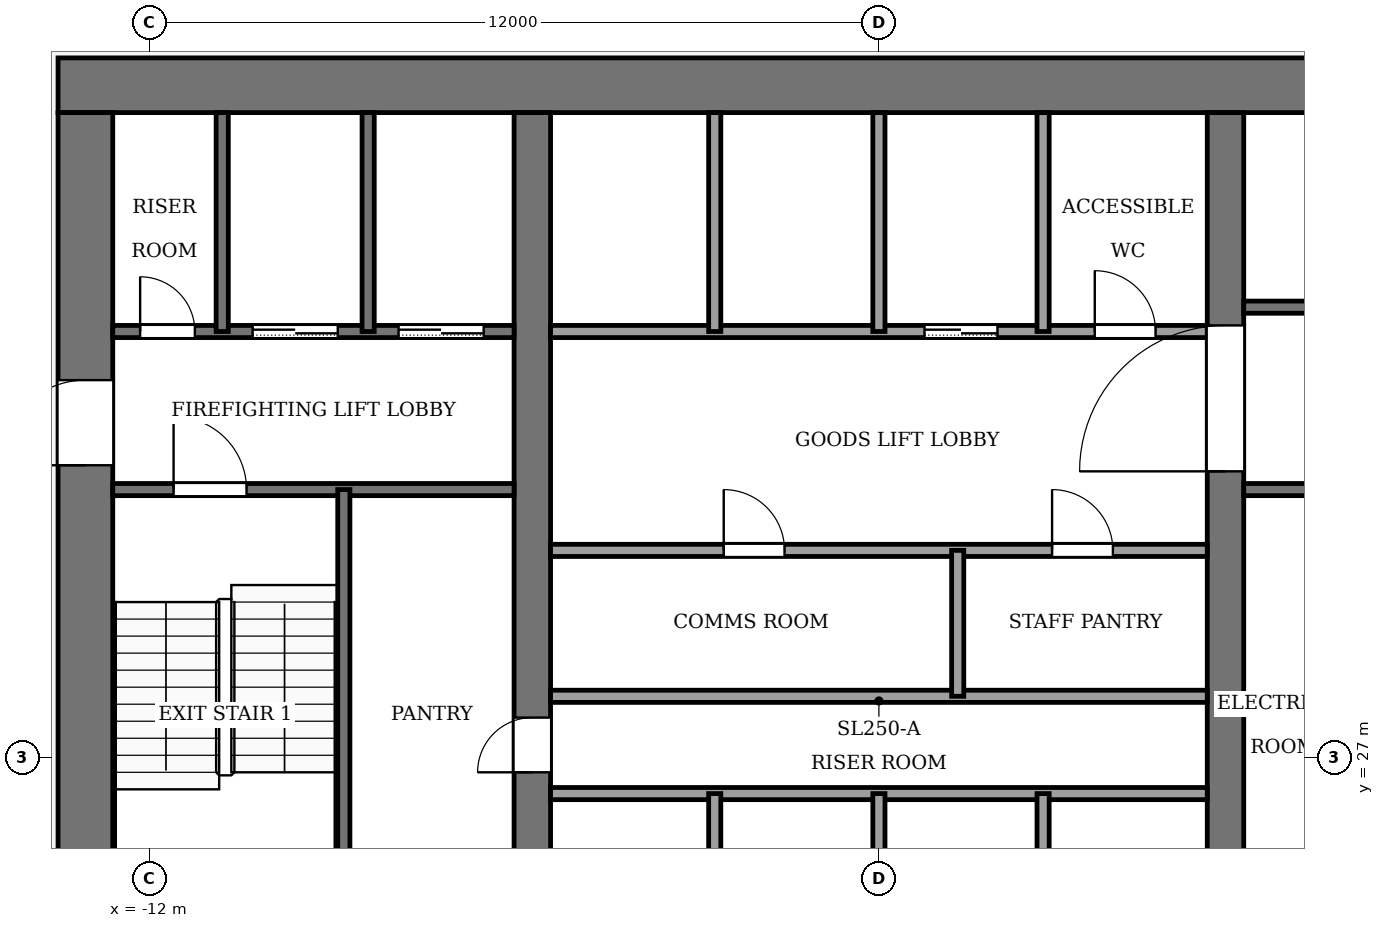
"""IFC4 building model, lengths in metres.
Left out: names, types, materials, properties, quantities, classifications, styles, units other than length and angle.
Written with IfcOpenShell. Run it as: python <this file> out.ifc"""

import sys

from ifc_helpers import new_model, si_unit, direction, frame, frame_2d, origin, place, context, subcontext, project, spatial, rectangle, extrude, element, fill, save


model = new_model("IFC4")
c1 = context("Model", 3, precision=1e-05, world=origin(), true_north=direction((0.0, 1.0)))
c2 = subcontext(c1, "Body", "Model", "MODEL_VIEW")
j1 = project(units=[si_unit("LENGTHUNIT", "METRE"), si_unit("PLANEANGLEUNIT", "RADIAN")], contexts=[c1])
p1 = place(None, origin())
s1 = spatial("IfcSite", under=j1, at=p1, CompositionType="ELEMENT")
p2 = place(p1, origin())
s2 = spatial("IfcBuilding", under=s1, at=p2, CompositionType="ELEMENT")
p3 = place(p2, frame((0.0, 0.0, 210.0)))
s3 = spatial("IfcBuildingStorey", under=s2, at=p3, CompositionType="ELEMENT", Elevation=210.0)
p4 = place(p3, frame((-13.5, 38.05, -0.13), z_axis=(0.0, 0.0, 1.0), x_axis=(1.0, 0.0, 0.0)))
e1 = element("IfcWall", 1, at=p4, inside=s3, PredefinedType="SHEAR", context=c2, shape_type="SweptSolid", body=[
    extrude(rectangle(XDim=27.0, YDim=0.9, at=frame_2d((13.5, 0.0))), origin(), (0.0, 0.0, 1.0), 4.0),
])
p5 = place(p3, frame((-13.05, 18.4, -0.13), z_axis=(0.0, 0.0, 1.0), x_axis=(0.0, 1.0, 0.0)))
e2 = element("IfcWall", 2, at=p5, inside=s3, PredefinedType="SHEAR", context=c2, shape_type="SweptSolid", body=[
    extrude(rectangle(XDim=19.2, YDim=0.9, at=frame_2d((9.6, 0.0))), origin(), (0.0, 0.0, 1.0), 4.0),
])
p6 = place(p5, frame((2.8, 0.0, 0.13)))
e3 = element("IfcOpeningElement", 3, at=p6, cuts=e2, PredefinedType="OPENING", context=c2, shape_type="SweptSolid", body=[
    extrude(rectangle(XDim=2.4, YDim=2.4, at=frame_2d((1.2, 1.2))), frame((0.0, 0.46, 0.0), z_axis=(0.0, -1.0, 0.0), x_axis=(1.0, 0.0, 0.0)), (0.0, 0.0, 1.0), 0.92),
])
p7 = place(p5, frame((13.4, 0.0, 0.13)))
e4 = element("IfcOpeningElement", 4, at=p7, cuts=e2, PredefinedType="OPENING", context=c2, shape_type="SweptSolid", body=[
    extrude(rectangle(XDim=1.4, YDim=2.2, at=frame_2d((0.7, 1.1))), frame((0.0, 0.46, 0.0), z_axis=(0.0, -1.0, 0.0), x_axis=(1.0, 0.0, 0.0)), (0.0, 0.0, 1.0), 0.92),
])
p8 = place(p3, frame((-5.7, 18.4, -0.13), z_axis=(0.0, 0.0, 1.0), x_axis=(0.0, 1.0, 0.0)))
e5 = element("IfcWall", 5, at=p8, inside=s3, PredefinedType="SHEAR", context=c2, shape_type="SweptSolid", body=[
    extrude(rectangle(XDim=19.2, YDim=0.6, at=frame_2d((9.6, 0.0))), origin(), (0.0, 0.0, 1.0), 4.0),
])
p9 = place(p8, frame((8.35, 0.0, 0.13)))
e6 = element("IfcOpeningElement", 6, at=p9, cuts=e5, PredefinedType="OPENING", context=c2, shape_type="SweptSolid", body=[
    extrude(rectangle(XDim=0.9, YDim=2.1, at=frame_2d((0.45, 1.05))), frame((0.0, 0.31, 0.0), z_axis=(0.0, -1.0, 0.0), x_axis=(1.0, 0.0, 0.0)), (0.0, 0.0, 1.0), 0.62),
])
p10 = place(p3, frame((5.7, 18.4, -0.13), z_axis=(0.0, 0.0, 1.0), x_axis=(0.0, 1.0, 0.0)))
e7 = element("IfcWall", 7, at=p10, inside=s3, PredefinedType="SHEAR", context=c2, shape_type="SweptSolid", body=[
    extrude(rectangle(XDim=19.2, YDim=0.6, at=frame_2d((9.6, 0.0))), origin(), (0.0, 0.0, 1.0), 4.0),
])
p11 = place(p10, frame((13.3, 0.0, 0.13)))
e8 = element("IfcOpeningElement", 8, at=p11, cuts=e7, PredefinedType="OPENING", context=c2, shape_type="SweptSolid", body=[
    extrude(rectangle(XDim=2.4, YDim=2.4, at=frame_2d((1.2, 1.2))), frame((0.0, 0.31, 0.0), z_axis=(0.0, -1.0, 0.0), x_axis=(1.0, 0.0, 0.0)), (0.0, 0.0, 1.0), 0.62),
])
for number, where, z_axis, x_axis in (
    (9, (-5.4, 26.4, 0.0), (0.0, 0.0, 1.0), (1.0, 0.0, 0.0)),
    (10, (-5.4, 28.0, 0.0), (0.0, 0.0, 1.0), (1.0, 0.0, 0.0)),
):
    element("IfcWall", number, at=place(p3, frame(where, z_axis=z_axis, x_axis=x_axis)), inside=s3, PredefinedType="PARTITIONING", context=c2, shape_type="SweptSolid", body=[
        extrude(rectangle(XDim=10.8, YDim=0.2, at=frame_2d((5.4, 0.0))), origin(), (0.0, 0.0, 1.0), 3.87),
    ])
p12 = place(p3, frame((-5.4, 30.4, 0.0), z_axis=(0.0, 0.0, 1.0), x_axis=(1.0, 0.0, 0.0)))
e11 = element("IfcWall", 11, at=p12, inside=s3, PredefinedType="PARTITIONING", context=c2, shape_type="SweptSolid", body=[
    extrude(rectangle(XDim=10.8, YDim=0.2, at=frame_2d((5.4, 0.0))), origin(), (0.0, 0.0, 1.0), 3.87),
])
p13 = place(p12, frame((2.848, 0.0, 0.0)))
e12 = element("IfcOpeningElement", 12, at=p13, cuts=e11, PredefinedType="OPENING", context=c2, shape_type="SweptSolid", body=[
    extrude(rectangle(XDim=1.0, YDim=2.1, at=frame_2d((0.5, 1.05))), frame((0.0, 0.11, 0.0), z_axis=(0.0, -1.0, 0.0), x_axis=(1.0, 0.0, 0.0)), (0.0, 0.0, 1.0), 0.22),
])
p14 = place(p12, frame((8.248, 0.0, 0.0)))
e13 = element("IfcOpeningElement", 13, at=p14, cuts=e11, PredefinedType="OPENING", context=c2, shape_type="SweptSolid", body=[
    extrude(rectangle(XDim=1.0, YDim=2.1, at=frame_2d((0.5, 1.05))), frame((0.0, 0.11, 0.0), z_axis=(0.0, -1.0, 0.0), x_axis=(1.0, 0.0, 0.0)), (0.0, 0.0, 1.0), 0.22),
])
p15 = place(p3, frame((-12.6, 31.4, 0.0), z_axis=(0.0, 0.0, 1.0), x_axis=(1.0, 0.0, 0.0)))
e14 = element("IfcWall", 14, at=p15, inside=s3, PredefinedType="PARTITIONING", context=c2, shape_type="SweptSolid", body=[
    extrude(rectangle(XDim=6.6, YDim=0.2, at=frame_2d((3.3, 0.0))), origin(), (0.0, 0.0, 1.0), 3.87),
])
p16 = place(p15, frame((1.0, 0.0, 0.0)))
e15 = element("IfcOpeningElement", 15, at=p16, cuts=e14, PredefinedType="OPENING", context=c2, shape_type="SweptSolid", body=[
    extrude(rectangle(XDim=1.2, YDim=2.2, at=frame_2d((0.6, 1.1))), frame((0.0, 0.11, 0.0), z_axis=(0.0, -1.0, 0.0), x_axis=(1.0, 0.0, 0.0)), (0.0, 0.0, 1.0), 0.22),
])
p17 = place(p3, frame((6.0, 31.4, 0.0), z_axis=(0.0, 0.0, 1.0), x_axis=(1.0, 0.0, 0.0)))
e16 = element("IfcWall", 16, at=p17, inside=s3, PredefinedType="PARTITIONING", context=c2, shape_type="SweptSolid", body=[
    extrude(rectangle(XDim=6.6, YDim=0.2, at=frame_2d((3.3, 0.0))), origin(), (0.0, 0.0, 1.0), 3.87),
])
p18 = place(p3, frame((-12.6, 34.0, 0.0), z_axis=(0.0, 0.0, 1.0), x_axis=(1.0, 0.0, 0.0)))
e17 = element("IfcWall", 17, at=p18, inside=s3, PredefinedType="PARTITIONING", context=c2, shape_type="SweptSolid", body=[
    extrude(rectangle(XDim=6.6, YDim=0.2, at=frame_2d((3.3, 0.0))), origin(), (0.0, 0.0, 1.0), 3.87),
])
p19 = place(p18, frame((4.7, 0.0, 0.0)))
e18 = element("IfcOpeningElement", 18, at=p19, cuts=e17, PredefinedType="OPENING", context=c2, shape_type="SweptSolid", body=[
    extrude(rectangle(XDim=1.4, YDim=2.2, at=frame_2d((0.7, 1.1))), frame((0.0, 0.11, 0.0), z_axis=(0.0, -1.0, 0.0), x_axis=(1.0, 0.0, 0.0)), (0.0, 0.0, 1.0), 0.22),
])
p20 = place(p18, frame((2.3, 0.0, 0.0)))
e19 = element("IfcOpeningElement", 19, at=p20, cuts=e17, PredefinedType="OPENING", context=c2, shape_type="SweptSolid", body=[
    extrude(rectangle(XDim=1.4, YDim=2.2, at=frame_2d((0.7, 1.1))), frame((0.0, 0.11, 0.0), z_axis=(0.0, -1.0, 0.0), x_axis=(1.0, 0.0, 0.0)), (0.0, 0.0, 1.0), 0.22),
])
p21 = place(p18, frame((0.45, 0.0, 0.0)))
e20 = element("IfcOpeningElement", 20, at=p21, cuts=e17, PredefinedType="OPENING", context=c2, shape_type="SweptSolid", body=[
    extrude(rectangle(XDim=0.9, YDim=2.1, at=frame_2d((0.45, 1.05))), frame((0.0, 0.11, 0.0), z_axis=(0.0, -1.0, 0.0), x_axis=(1.0, 0.0, 0.0)), (0.0, 0.0, 1.0), 0.22),
])
p22 = place(p3, frame((-5.4, 34.0, 0.0), z_axis=(0.0, 0.0, 1.0), x_axis=(1.0, 0.0, 0.0)))
e21 = element("IfcWall", 21, at=p22, inside=s3, PredefinedType="PARTITIONING", context=c2, shape_type="SweptSolid", body=[
    extrude(rectangle(XDim=10.8, YDim=0.2, at=frame_2d((5.4, 0.0))), origin(), (0.0, 0.0, 1.0), 3.87),
])
p23 = place(p22, frame((6.15, 0.0, 0.0)))
e22 = element("IfcOpeningElement", 22, at=p23, cuts=e21, PredefinedType="OPENING", context=c2, shape_type="SweptSolid", body=[
    extrude(rectangle(XDim=1.2, YDim=2.2, at=frame_2d((0.6, 1.1))), frame((0.0, 0.11, 0.0), z_axis=(0.0, -1.0, 0.0), x_axis=(1.0, 0.0, 0.0)), (0.0, 0.0, 1.0), 0.22),
])
p24 = place(p22, frame((8.95, 0.0, 0.0)))
e23 = element("IfcOpeningElement", 23, at=p24, cuts=e21, PredefinedType="OPENING", context=c2, shape_type="SweptSolid", body=[
    extrude(rectangle(XDim=1.0, YDim=2.1, at=frame_2d((0.5, 1.05))), frame((0.0, 0.11, 0.0), z_axis=(0.0, -1.0, 0.0), x_axis=(1.0, 0.0, 0.0)), (0.0, 0.0, 1.0), 0.22),
])
p25 = place(p3, frame((6.0, 34.4, 0.0), z_axis=(0.0, 0.0, 1.0), x_axis=(1.0, 0.0, 0.0)))
e24 = element("IfcWall", 24, at=p25, inside=s3, PredefinedType="PARTITIONING", context=c2, shape_type="SweptSolid", body=[
    extrude(rectangle(XDim=6.6, YDim=0.2, at=frame_2d((3.3, 0.0))), origin(), (0.0, 0.0, 1.0), 3.87),
])
p26 = place(p25, frame((4.8, 0.0, 0.0)))
e25 = element("IfcOpeningElement", 25, at=p26, cuts=e24, PredefinedType="OPENING", context=c2, shape_type="SweptSolid", body=[
    extrude(rectangle(XDim=1.2, YDim=2.2, at=frame_2d((0.6, 1.1))), frame((0.0, 0.11, 0.0), z_axis=(0.0, -1.0, 0.0), x_axis=(1.0, 0.0, 0.0)), (0.0, 0.0, 1.0), 0.22),
])
p27 = place(p3, frame((-10.8, 34.0, 0.0), z_axis=(0.0, 0.0, 1.0), x_axis=(0.0, 1.0, 0.0)))
e26 = element("IfcWall", 26, at=p27, inside=s3, PredefinedType="PARTITIONING", context=c2, shape_type="SweptSolid", body=[
    extrude(rectangle(XDim=3.6, YDim=0.2, at=frame_2d((1.8, 0.0))), origin(), (0.0, 0.0, 1.0), 3.87),
])
p28 = place(p3, frame((-8.8, 24.0, 0.0), z_axis=(0.0, 0.0, 1.0), x_axis=(0.0, 1.0, 0.0)))
e27 = element("IfcWall", 27, at=p28, inside=s3, PredefinedType="PARTITIONING", context=c2, shape_type="SweptSolid", body=[
    extrude(rectangle(XDim=7.4, YDim=0.2, at=frame_2d((3.7, 0.0))), origin(), (0.0, 0.0, 1.0), 3.87),
])
p29 = place(p3, frame((-8.4, 34.0, 0.0), z_axis=(0.0, 0.0, 1.0), x_axis=(0.0, 1.0, 0.0)))
e28 = element("IfcWall", 28, at=p29, inside=s3, PredefinedType="PARTITIONING", context=c2, shape_type="SweptSolid", body=[
    extrude(rectangle(XDim=3.6, YDim=0.2, at=frame_2d((1.8, 0.0))), origin(), (0.0, 0.0, 1.0), 3.87),
])
p30 = place(p3, frame((-2.7, 24.0, 0.0), z_axis=(0.0, 0.0, 1.0), x_axis=(0.0, 1.0, 0.0)))
e29 = element("IfcWall", 29, at=p30, inside=s3, PredefinedType="PARTITIONING", context=c2, shape_type="SweptSolid", body=[
    extrude(rectangle(XDim=2.4, YDim=0.2, at=frame_2d((1.2, 0.0))), origin(), (0.0, 0.0, 1.0), 3.87),
])
p31 = place(p3, frame((-2.7, 34.0, 0.0), z_axis=(0.0, 0.0, 1.0), x_axis=(0.0, 1.0, 0.0)))
e30 = element("IfcWall", 30, at=p31, inside=s3, PredefinedType="PARTITIONING", context=c2, shape_type="SweptSolid", body=[
    extrude(rectangle(XDim=3.6, YDim=0.2, at=frame_2d((1.8, 0.0))), origin(), (0.0, 0.0, 1.0), 3.87),
])
p32 = place(p3, frame((0.0, 24.0, 0.0), z_axis=(0.0, 0.0, 1.0), x_axis=(0.0, 1.0, 0.0)))
e31 = element("IfcWall", 31, at=p32, inside=s3, PredefinedType="PARTITIONING", context=c2, shape_type="SweptSolid", body=[
    extrude(rectangle(XDim=2.4, YDim=0.2, at=frame_2d((1.2, 0.0))), origin(), (0.0, 0.0, 1.0), 3.87),
])
p33 = place(p3, frame((0.0, 34.0, 0.0), z_axis=(0.0, 0.0, 1.0), x_axis=(0.0, 1.0, 0.0)))
e32 = element("IfcWall", 32, at=p33, inside=s3, PredefinedType="PARTITIONING", context=c2, shape_type="SweptSolid", body=[
    extrude(rectangle(XDim=3.6, YDim=0.2, at=frame_2d((1.8, 0.0))), origin(), (0.0, 0.0, 1.0), 3.87),
])
for number, where, z_axis, x_axis in (
    (33, (1.296, 28.0, 0.0), (0.0, 0.0, 1.0), (0.0, 1.0, 0.0)),
    (34, (2.7, 24.0, 0.0), (0.0, 0.0, 1.0), (0.0, 1.0, 0.0)),
):
    element("IfcWall", number, at=place(p3, frame(where, z_axis=z_axis, x_axis=x_axis)), inside=s3, PredefinedType="PARTITIONING", context=c2, shape_type="SweptSolid", body=[
        extrude(rectangle(XDim=2.4, YDim=0.2, at=frame_2d((1.2, 0.0))), origin(), (0.0, 0.0, 1.0), 3.87),
    ])
p34 = place(p3, frame((2.7, 34.0, 0.0), z_axis=(0.0, 0.0, 1.0), x_axis=(0.0, 1.0, 0.0)))
e35 = element("IfcWall", 35, at=p34, inside=s3, PredefinedType="PARTITIONING", context=c2, shape_type="SweptSolid", body=[
    extrude(rectangle(XDim=3.6, YDim=0.2, at=frame_2d((1.8, 0.0))), origin(), (0.0, 0.0, 1.0), 3.87),
])
p35 = place(p23, origin())
e36 = element("IfcDoor", 36, at=p35, inside=s3, OperationType="SLIDING_TO_LEFT", PredefinedType="DOOR", context=c2, shape_type="SweptSolid", body=[
    extrude(rectangle(XDim=1.2, YDim=2.2, at=frame_2d((0.6, 1.1))), frame((0.0, 0.025, 0.0), z_axis=(0.0, -1.0, 0.0), x_axis=(1.0, 0.0, 0.0)), (0.0, 0.0, 1.0), 0.05),
])
fill(e22, e36)
p36 = place(p19, origin())
e37 = element("IfcDoor", 37, at=p36, inside=s3, OperationType="SLIDING_TO_LEFT", PredefinedType="DOOR", context=c2, shape_type="SweptSolid", body=[
    extrude(rectangle(XDim=1.4, YDim=2.2, at=frame_2d((0.7, 1.1))), frame((0.0, 0.025, 0.0), z_axis=(0.0, -1.0, 0.0), x_axis=(1.0, 0.0, 0.0)), (0.0, 0.0, 1.0), 0.05),
])
fill(e18, e37)
p37 = place(p20, origin())
e38 = element("IfcDoor", 38, at=p37, inside=s3, OperationType="SLIDING_TO_LEFT", PredefinedType="DOOR", context=c2, shape_type="SweptSolid", body=[
    extrude(rectangle(XDim=1.4, YDim=2.2, at=frame_2d((0.7, 1.1))), frame((0.0, 0.025, 0.0), z_axis=(0.0, -1.0, 0.0), x_axis=(1.0, 0.0, 0.0)), (0.0, 0.0, 1.0), 0.05),
])
fill(e19, e38)
p38 = place(p21, origin())
e39 = element("IfcDoor", 39, at=p38, inside=s3, OperationType="SINGLE_SWING_RIGHT", PredefinedType="DOOR", context=c2, shape_type="SweptSolid", body=[
    extrude(rectangle(XDim=0.9, YDim=2.1, at=frame_2d((0.45, 1.05))), frame((0.0, 0.025, 0.0), z_axis=(0.0, -1.0, 0.0), x_axis=(1.0, 0.0, 0.0)), (0.0, 0.0, 1.0), 0.05),
])
fill(e20, e39)
p39 = place(p13, origin())
e40 = element("IfcDoor", 40, at=p39, inside=s3, OperationType="SINGLE_SWING_LEFT", PredefinedType="DOOR", context=c2, shape_type="SweptSolid", body=[
    extrude(rectangle(XDim=1.0, YDim=2.1, at=frame_2d((0.5, 1.05))), frame((0.0, 0.025, 0.0), z_axis=(0.0, -1.0, 0.0), x_axis=(1.0, 0.0, 0.0)), (0.0, 0.0, 1.0), 0.05),
])
fill(e12, e40)
p40 = place(p14, origin())
e41 = element("IfcDoor", 41, at=p40, inside=s3, OperationType="SINGLE_SWING_RIGHT", PredefinedType="DOOR", context=c2, shape_type="SweptSolid", body=[
    extrude(rectangle(XDim=1.0, YDim=2.1, at=frame_2d((0.5, 1.05))), frame((0.0, 0.025, 0.0), z_axis=(0.0, -1.0, 0.0), x_axis=(1.0, 0.0, 0.0)), (0.0, 0.0, 1.0), 0.05),
])
fill(e13, e41)
p41 = place(p24, origin())
e42 = element("IfcDoor", 42, at=p41, inside=s3, OperationType="SINGLE_SWING_LEFT", PredefinedType="DOOR", context=c2, shape_type="SweptSolid", body=[
    extrude(rectangle(XDim=1.0, YDim=2.1, at=frame_2d((0.5, 1.05))), frame((0.0, 0.025, 0.0), z_axis=(0.0, -1.0, 0.0), x_axis=(1.0, 0.0, 0.0)), (0.0, 0.0, 1.0), 0.05),
])
fill(e23, e42)
p42 = place(p9, origin())
e43 = element("IfcDoor", 43, at=p42, inside=s3, OperationType="SINGLE_SWING_LEFT", PredefinedType="DOOR", context=c2, shape_type="SweptSolid", body=[
    extrude(rectangle(XDim=0.9, YDim=2.1, at=frame_2d((0.45, 1.05))), frame((0.0, 0.025, 0.0), z_axis=(0.0, -1.0, 0.0), x_axis=(1.0, 0.0, 0.0)), (0.0, 0.0, 1.0), 0.05),
])
fill(e6, e43)
p43 = place(p16, origin())
e44 = element("IfcDoor", 44, at=p43, inside=s3, OperationType="SINGLE_SWING_LEFT", PredefinedType="DOOR", context=c2, shape_type="SweptSolid", body=[
    extrude(rectangle(XDim=1.2, YDim=2.2, at=frame_2d((0.6, 1.1))), frame((0.0, 0.025, 0.0), z_axis=(0.0, -1.0, 0.0), x_axis=(1.0, 0.0, 0.0)), (0.0, 0.0, 1.0), 0.05),
])
fill(e15, e44)
p44 = place(p11, origin())
e45 = element("IfcDoor", 45, at=p44, inside=s3, OperationType="DOUBLE_DOOR_SINGLE_SWING", PredefinedType="DOOR", context=c2, shape_type="SweptSolid", body=[
    extrude(rectangle(XDim=2.4, YDim=2.4, at=frame_2d((1.2, 1.2))), frame((0.0, 0.025, 0.0), z_axis=(0.0, -1.0, 0.0), x_axis=(1.0, 0.0, 0.0)), (0.0, 0.0, 1.0), 0.05),
])
fill(e8, e45)
p45 = place(p7, origin())
e46 = element("IfcDoor", 46, at=p45, inside=s3, OperationType="SINGLE_SWING_LEFT", PredefinedType="DOOR", context=c2, shape_type="SweptSolid", body=[
    extrude(rectangle(XDim=1.4, YDim=2.2, at=frame_2d((0.7, 1.1))), frame((0.0, 0.025, 0.0), z_axis=(0.0, -1.0, 0.0), x_axis=(1.0, 0.0, 0.0)), (0.0, 0.0, 1.0), 0.05),
])
fill(e4, e46)
save(model, sys.argv[1])
